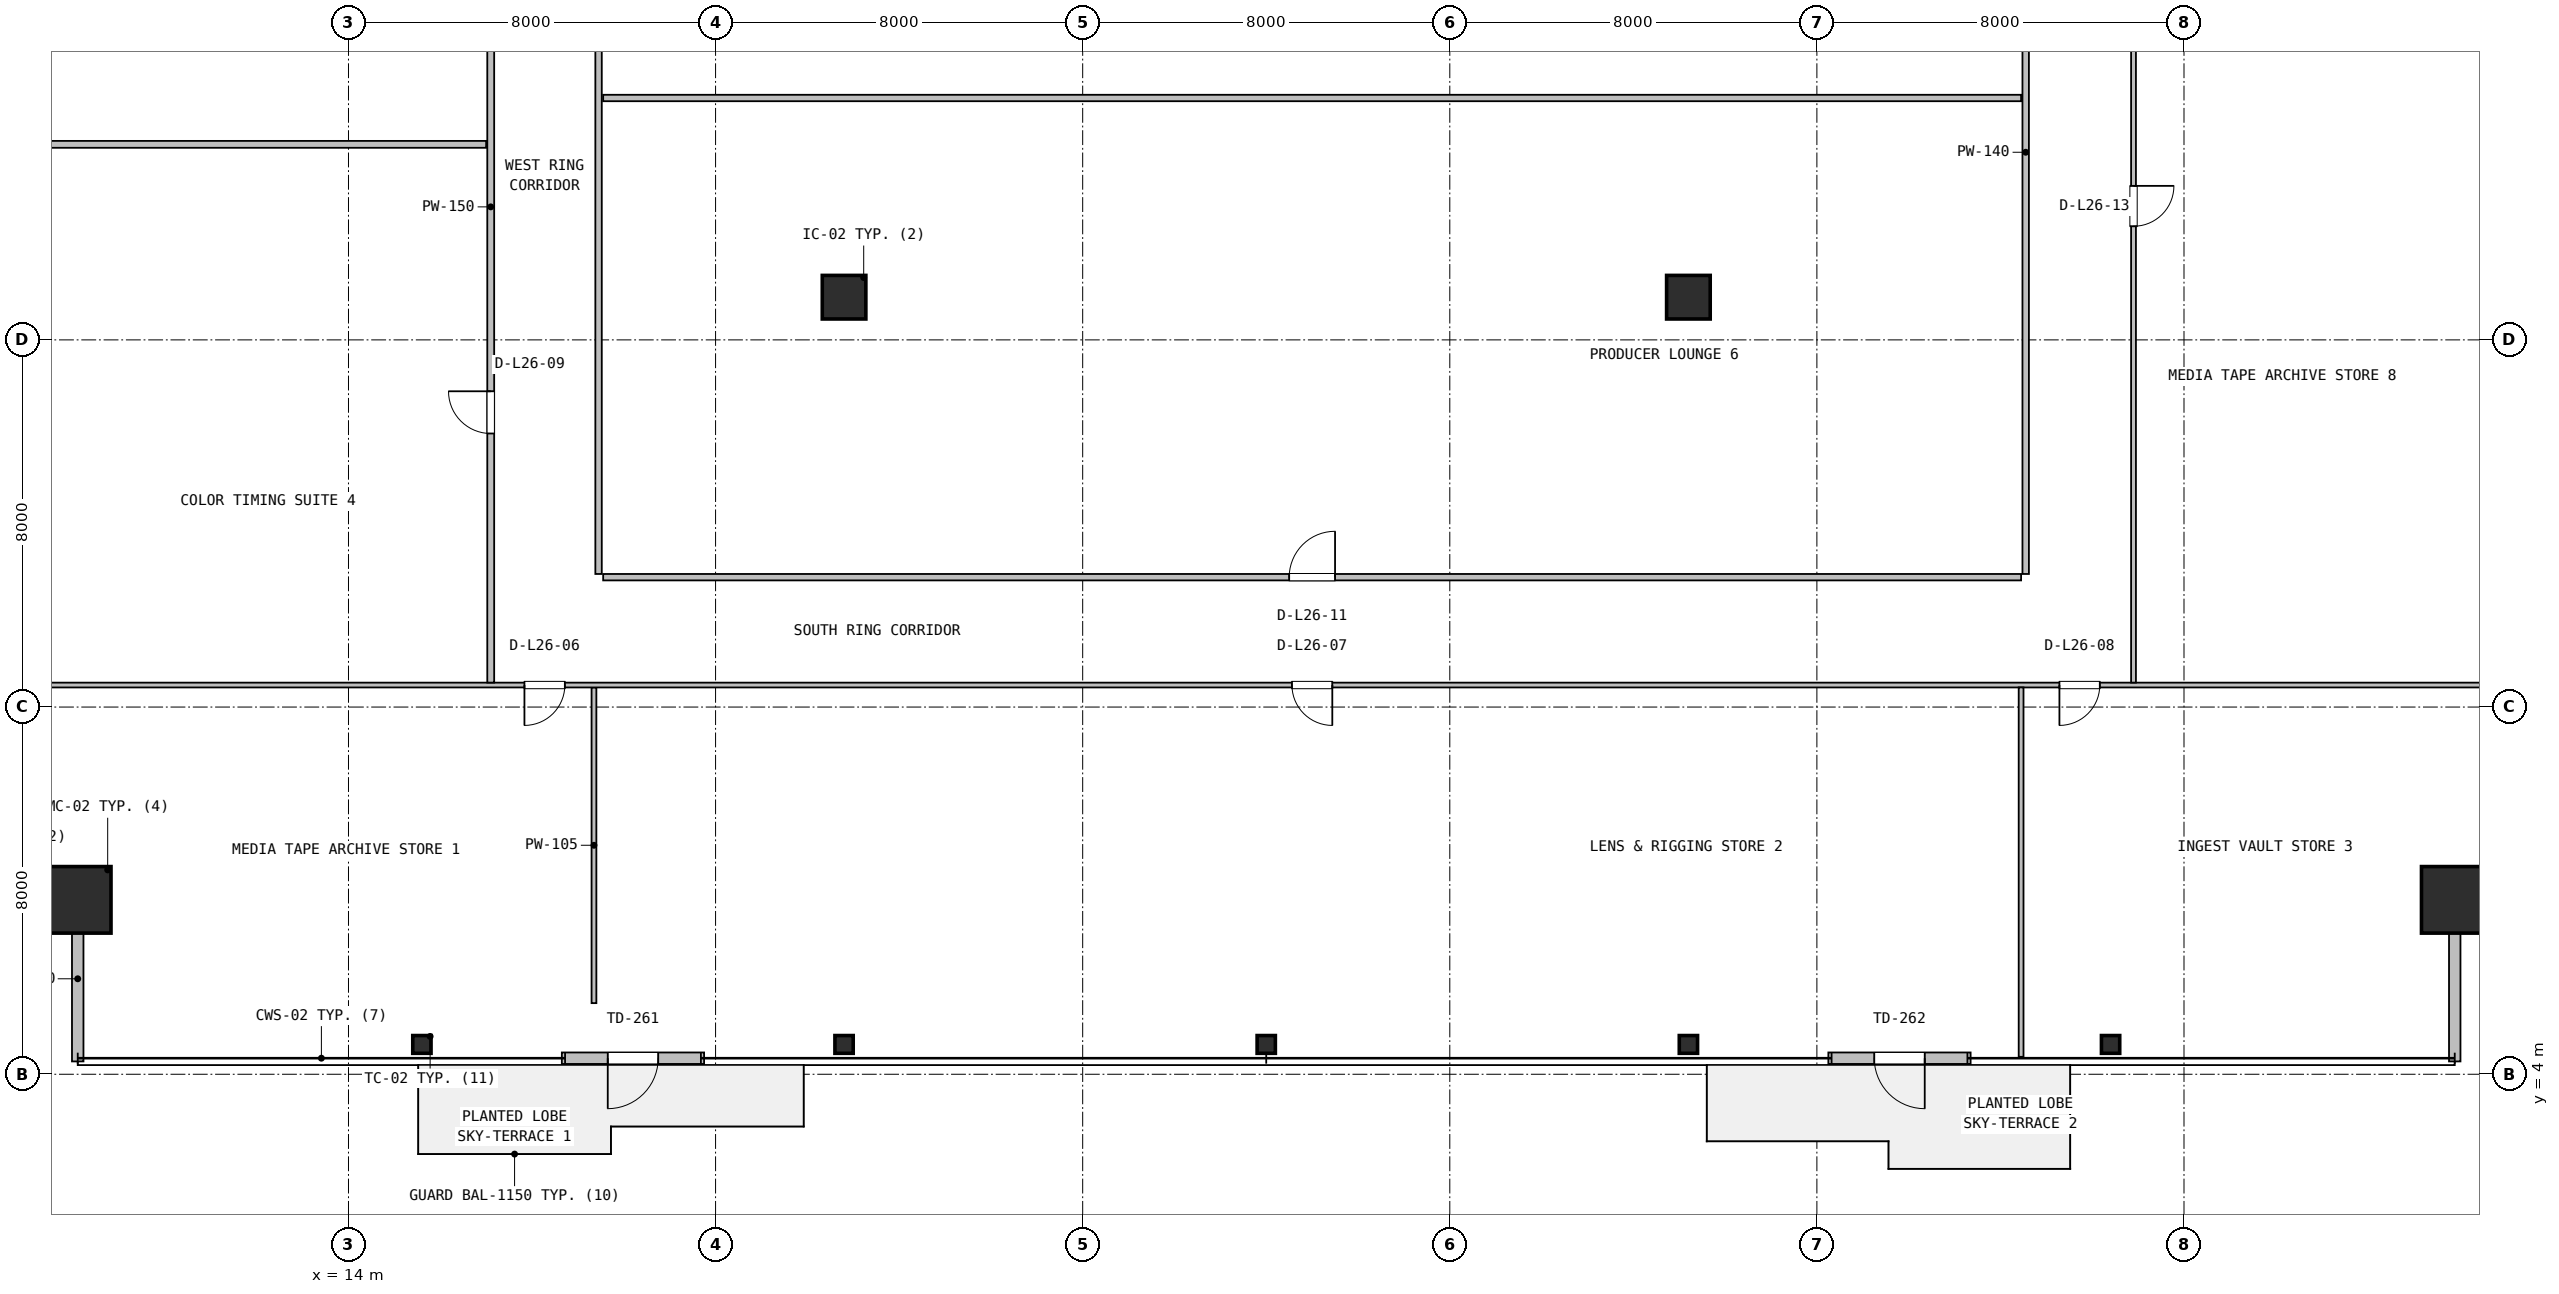
"""IFC4 building model, lengths in metres.
Left out: names, types, materials, properties, quantities, classifications, styles, units other than length and angle.
Written with IfcOpenShell. Run it as: python <this file> out.ifc"""

import sys

from ifc_helpers import new_model, si_unit, direction, frame, frame_2d, origin, origin_2d, place, context, subcontext, project, spatial, rectangle, hollow_rectangle, i_section, extrude, source, transform, mapped, element, fill, save


model = new_model("IFC4")
c1 = context("Model", 3, precision=1e-05, world=origin(), true_north=direction((0.0, 1.0)))
c2 = subcontext(c1, "Body", "Model", "MODEL_VIEW")
j1 = project(units=[si_unit("LENGTHUNIT", "METRE"), si_unit("PLANEANGLEUNIT", "RADIAN")], contexts=[c1])
p1 = place(None, origin())
s1 = spatial("IfcSite", under=j1, at=p1, CompositionType="ELEMENT")
p2 = place(p1, origin())
s2 = spatial("IfcBuilding", under=s1, at=p2, CompositionType="ELEMENT")
p3 = place(p2, frame((0.0, 0.0, 110.6)))
s3 = spatial("IfcBuildingStorey", under=s2, at=p3, CompositionType="ELEMENT", Elevation=110.6)
m1 = source(origin(), c2, "Body", "SweptSolid", [
    extrude(hollow_rectangle(XDim=1.45, YDim=1.45, WallThickness=0.055, at=origin_2d()), origin(), (0.0, 0.0, 1.0), 3.8),
])
for number, where, z_axis, x_axis in (
    (1, (8.1, 7.8, 0.0), (0.0, 0.0, 1.0), (1.0, 0.0, 0.0)),
    (2, (59.9, 7.8, 0.0), (0.0, 0.0, 1.0), (1.0, 0.0, 0.0)),
):
    element("IfcColumn", number, at=place(p3, frame(where, z_axis=z_axis, x_axis=x_axis)), inside=s3, PredefinedType="COLUMN", context=c2, shape_type="MappedRepresentation", body=[
        mapped(m1, transform((0.0, 0.0, 0.0), x_axis=(1.0, 0.0, 0.0), y_axis=(0.0, 1.0, 0.0), z_axis=(0.0, 0.0, 1.0), scale=1.0)),
    ])
m2 = source(origin(), c2, "Body", "SweptSolid", [
    extrude(i_section(OverallWidth=0.398, OverallDepth=0.387, WebThickness=0.021, FlangeThickness=0.033, FilletRadius=0.018, at=origin_2d()), origin(), (0.0, 0.0, 1.0), 3.8),
])
for number, where, z_axis, x_axis in (
    (3, (15.6, 4.65, 0.0), (0.0, 0.0, 1.0), (1.0, 0.0, 0.0)),
    (4, (24.8, 4.65, 0.0), (0.0, 0.0, 1.0), (1.0, 0.0, 0.0)),
    (5, (34.0, 4.65, 0.0), (0.0, 0.0, 1.0), (1.0, 0.0, 0.0)),
    (6, (43.2, 4.65, 0.0), (0.0, 0.0, 1.0), (1.0, 0.0, 0.0)),
    (7, (52.4, 4.65, 0.0), (0.0, 0.0, 1.0), (1.0, 0.0, 0.0)),
):
    element("IfcColumn", number, at=place(p3, frame(where, z_axis=z_axis, x_axis=x_axis)), inside=s3, PredefinedType="COLUMN", context=c2, shape_type="MappedRepresentation", body=[
        mapped(m2, transform((0.0, 0.0, 0.0), x_axis=(1.0, 0.0, 0.0), y_axis=(0.0, 1.0, 0.0), z_axis=(0.0, 0.0, 1.0), scale=1.0)),
    ])
m3 = source(origin(), c2, "Body", "SweptSolid", [
    extrude(rectangle(XDim=0.95, YDim=0.95, at=origin_2d()), origin(), (0.0, 0.0, 1.0), 3.8),
])
for number, where, z_axis, x_axis in (
    (8, (24.8, 20.93, 0.0), (0.0, 0.0, 1.0), (1.0, 0.0, 0.0)),
    (9, (43.2, 20.93, 0.0), (0.0, 0.0, 1.0), (1.0, 0.0, 0.0)),
):
    element("IfcColumn", number, at=place(p3, frame(where, z_axis=z_axis, x_axis=x_axis)), inside=s3, PredefinedType="COLUMN", context=c2, shape_type="MappedRepresentation", body=[
        mapped(m3, transform((0.0, 0.0, 0.0), x_axis=(1.0, 0.0, 0.0), y_axis=(0.0, 1.0, 0.0), z_axis=(0.0, 0.0, 1.0), scale=1.0)),
    ])
p4 = place(p3, frame((18.65, 4.35, 0.0), z_axis=(0.0, 0.0, 1.0), x_axis=(1.0, 0.0, 0.0)))
e10 = element("IfcWall", 10, at=p4, inside=s3, PredefinedType="SOLIDWALL", context=c2, shape_type="SweptSolid", body=[
    extrude(rectangle(XDim=3.1, YDim=0.25, at=frame_2d((1.55, 0.0))), origin(), (0.0, 0.0, 1.0), 3.53),
])
p5 = place(p4, frame((1.0, 0.0, 0.0)))
e11 = element("IfcOpeningElement", 11, at=p5, cuts=e10, PredefinedType="OPENING", context=c2, shape_type="SweptSolid", body=[
    extrude(rectangle(XDim=1.1, YDim=2.15, at=frame_2d((0.55, 1.075))), frame((0.0, 0.135, 0.0), z_axis=(0.0, -1.0, 0.0), x_axis=(1.0, 0.0, 0.0)), (0.0, 0.0, 1.0), 0.27),
])
p6 = place(p3, frame((46.25, 4.35, 0.0), z_axis=(0.0, 0.0, 1.0), x_axis=(1.0, 0.0, 0.0)))
e12 = element("IfcWall", 12, at=p6, inside=s3, PredefinedType="SOLIDWALL", context=c2, shape_type="SweptSolid", body=[
    extrude(rectangle(XDim=3.1, YDim=0.25, at=frame_2d((1.55, 0.0))), origin(), (0.0, 0.0, 1.0), 3.53),
])
p7 = place(p6, frame((1.0, 0.0, 0.0)))
e13 = element("IfcOpeningElement", 13, at=p7, cuts=e12, PredefinedType="OPENING", context=c2, shape_type="SweptSolid", body=[
    extrude(rectangle(XDim=1.1, YDim=2.15, at=frame_2d((0.55, 1.075))), frame((0.0, 0.135, 0.0), z_axis=(0.0, -1.0, 0.0), x_axis=(1.0, 0.0, 0.0)), (0.0, 0.0, 1.0), 0.27),
])
for number, where, z_axis, x_axis in (
    (14, (8.1, 4.28, 0.0), (0.0, 0.0, 1.0), (0.0, 1.0, 0.0)),
    (15, (59.9, 4.28, 0.0), (0.0, 0.0, 1.0), (0.0, 1.0, 0.0)),
):
    element("IfcWall", number, at=place(p3, frame(where, z_axis=z_axis, x_axis=x_axis)), inside=s3, PredefinedType="SOLIDWALL", context=c2, shape_type="SweptSolid", body=[
        extrude(rectangle(XDim=3.6, YDim=0.25, at=frame_2d((1.8, 0.0))), origin(), (0.0, 0.0, 1.0), 3.108),
    ])
p8 = place(p3, frame((19.35, 5.55, 0.0), z_axis=(0.0, 0.0, 1.0), x_axis=(0.0, 1.0, 0.0)))
e16 = element("IfcWall", 16, at=p8, inside=s3, PredefinedType="PARTITIONING", context=c2, shape_type="SweptSolid", body=[
    extrude(rectangle(XDim=6.878, YDim=0.105, at=frame_2d((3.439, 0.0))), origin(), (0.0, 0.0, 1.0), 3.222),
])
p9 = place(p3, frame((4.68, 12.48, 0.0), z_axis=(0.0, 0.0, 1.0), x_axis=(1.0, 0.0, 0.0)))
e17 = element("IfcWall", 17, at=p9, inside=s3, PredefinedType="PARTITIONING", context=c2, shape_type="SweptSolid", body=[
    extrude(rectangle(XDim=58.64, YDim=0.105, at=frame_2d((29.32, 0.0))), origin(), (0.0, 0.0, 1.0), 2.83),
])
p10 = place(p9, frame((13.155, 0.0, 0.0)))
e18 = element("IfcOpeningElement", 18, at=p10, cuts=e17, PredefinedType="OPENING", context=c2, shape_type="SweptSolid", body=[
    extrude(rectangle(XDim=0.88, YDim=2.06, at=frame_2d((0.44, 1.03))), frame((0.0, 0.062, 0.0), z_axis=(0.0, -1.0, 0.0), x_axis=(1.0, 0.0, 0.0)), (0.0, 0.0, 1.0), 0.125),
])
p11 = place(p9, frame((29.88, 0.0, 0.0)))
e19 = element("IfcOpeningElement", 19, at=p11, cuts=e17, PredefinedType="OPENING", context=c2, shape_type="SweptSolid", body=[
    extrude(rectangle(XDim=0.88, YDim=2.06, at=frame_2d((0.44, 1.03))), frame((0.0, 0.062, 0.0), z_axis=(0.0, -1.0, 0.0), x_axis=(1.0, 0.0, 0.0)), (0.0, 0.0, 1.0), 0.125),
])
p12 = place(p9, frame((46.605, 0.0, 0.0)))
e20 = element("IfcOpeningElement", 20, at=p12, cuts=e17, PredefinedType="OPENING", context=c2, shape_type="SweptSolid", body=[
    extrude(rectangle(XDim=0.88, YDim=2.06, at=frame_2d((0.44, 1.03))), frame((0.0, 0.062, 0.0), z_axis=(0.0, -1.0, 0.0), x_axis=(1.0, 0.0, 0.0)), (0.0, 0.0, 1.0), 0.125),
])
p13 = place(p3, frame((50.45, 4.38, 0.0), z_axis=(0.0, 0.0, 1.0), x_axis=(0.0, 1.0, 0.0)))
e21 = element("IfcWall", 21, at=p13, inside=s3, PredefinedType="PARTITIONING", context=c2, shape_type="SweptSolid", body=[
    extrude(rectangle(XDim=8.048, YDim=0.105, at=frame_2d((4.024, 0.0))), origin(), (0.0, 0.0, 1.0), 3.108),
])
p14 = place(p3, frame((17.1, 12.533, 0.0), z_axis=(0.0, 0.0, 1.0), x_axis=(0.0, 1.0, 0.0)))
e22 = element("IfcWall", 22, at=p14, inside=s3, PredefinedType="PARTITIONING", context=c2, shape_type="SweptSolid", body=[
    extrude(rectangle(XDim=20.73, YDim=0.15, at=frame_2d((10.365, 0.0))), origin(), (0.0, 0.0, 1.0), 3.222),
])
p15 = place(p14, frame((5.427, 0.0, 0.0)))
e23 = element("IfcOpeningElement", 23, at=p15, cuts=e22, PredefinedType="OPENING", context=c2, shape_type="SweptSolid", body=[
    extrude(rectangle(XDim=0.92, YDim=2.08, at=frame_2d((0.46, 1.04))), frame((0.0, 0.085, 0.0), z_axis=(0.0, -1.0, 0.0), x_axis=(1.0, 0.0, 0.0)), (0.0, 0.0, 1.0), 0.17),
])
p16 = place(p14, frame((15.797, 0.0, 0.0)))
e24 = element("IfcOpeningElement", 24, at=p16, cuts=e22, PredefinedType="OPENING", context=c2, shape_type="SweptSolid", body=[
    extrude(rectangle(XDim=1.05, YDim=2.1, at=frame_2d((0.525, 1.05))), frame((0.0, 0.085, 0.0), z_axis=(0.0, -1.0, 0.0), x_axis=(1.0, 0.0, 0.0)), (0.0, 0.0, 1.0), 0.17),
])
p17 = place(p3, frame((4.68, 24.26, 0.0), z_axis=(0.0, 0.0, 1.0), x_axis=(1.0, 0.0, 0.0)))
e25 = element("IfcWall", 25, at=p17, inside=s3, PredefinedType="PARTITIONING", context=c2, shape_type="SweptSolid", body=[
    extrude(rectangle(XDim=12.32, YDim=0.15, at=frame_2d((6.16, 0.0))), origin(), (0.0, 0.0, 1.0), 3.108),
])
p18 = place(p3, frame((19.55, 14.83, 0.0), z_axis=(0.0, 0.0, 1.0), x_axis=(1.0, 0.0, 0.0)))
e26 = element("IfcWall", 26, at=p18, inside=s3, PredefinedType="PARTITIONING", context=c2, shape_type="SweptSolid", body=[
    extrude(rectangle(XDim=30.9, YDim=0.14, at=frame_2d((15.45, 0.0))), origin(), (0.0, 0.0, 1.0), 2.83),
])
p19 = place(p18, frame((14.95, 0.0, 0.0)))
e27 = element("IfcOpeningElement", 27, at=p19, cuts=e26, PredefinedType="OPENING", context=c2, shape_type="SweptSolid", body=[
    extrude(rectangle(XDim=1.0, YDim=2.1, at=frame_2d((0.5, 1.05))), frame((0.0, 0.08, 0.0), z_axis=(0.0, -1.0, 0.0), x_axis=(1.0, 0.0, 0.0)), (0.0, 0.0, 1.0), 0.16),
])
p20 = place(p3, frame((50.55, 14.9, 0.0), z_axis=(0.0, 0.0, 1.0), x_axis=(0.0, 1.0, 0.0)))
e28 = element("IfcWall", 28, at=p20, inside=s3, PredefinedType="PARTITIONING", context=c2, shape_type="SweptSolid", body=[
    extrude(rectangle(XDim=18.375, YDim=0.14, at=frame_2d((9.188, 0.0))), origin(), (0.0, 0.0, 1.0), 3.222),
])
p21 = place(p3, frame((19.55, 25.27, 0.0), z_axis=(0.0, 0.0, 1.0), x_axis=(1.0, 0.0, 0.0)))
e29 = element("IfcWall", 29, at=p21, inside=s3, PredefinedType="PARTITIONING", context=c2, shape_type="SweptSolid", body=[
    extrude(rectangle(XDim=30.9, YDim=0.14, at=frame_2d((15.45, 0.0))), origin(), (0.0, 0.0, 1.0), 2.83),
])
p22 = place(p3, frame((19.45, 14.9, 0.0), z_axis=(0.0, 0.0, 1.0), x_axis=(0.0, 1.0, 0.0)))
e30 = element("IfcWall", 30, at=p22, inside=s3, PredefinedType="PARTITIONING", context=c2, shape_type="SweptSolid", body=[
    extrude(rectangle(XDim=18.375, YDim=0.14, at=frame_2d((9.188, 0.0))), origin(), (0.0, 0.0, 1.0), 3.222),
])
p23 = place(p3, frame((52.9, 12.533, 0.0), z_axis=(0.0, 0.0, 1.0), x_axis=(0.0, 1.0, 0.0)))
e31 = element("IfcWall", 31, at=p23, inside=s3, PredefinedType="PARTITIONING", context=c2, shape_type="SweptSolid", body=[
    extrude(rectangle(XDim=20.764, YDim=0.105, at=frame_2d((10.382, 0.0))), origin(), (0.0, 0.0, 1.0), 3.222),
])
p24 = place(p23, frame((9.942, 0.0, 0.0)))
e32 = element("IfcOpeningElement", 32, at=p24, cuts=e31, PredefinedType="OPENING", context=c2, shape_type="SweptSolid", body=[
    extrude(rectangle(XDim=0.88, YDim=2.06, at=frame_2d((0.44, 1.03))), frame((0.0, 0.062, 0.0), z_axis=(0.0, -1.0, 0.0), x_axis=(1.0, 0.0, 0.0)), (0.0, 0.0, 1.0), 0.125),
])
m4 = source(origin(), c2, "Body", "SweptSolid", [
    extrude(rectangle(XDim=1.1, YDim=2.15, at=frame_2d((0.55, 1.075))), frame((0.0, 0.025, 0.0), z_axis=(0.0, -1.0, 0.0), x_axis=(1.0, 0.0, 0.0)), (0.0, 0.0, 1.0), 0.05),
])
p25 = place(p5, frame((1.1, 0.0, 0.0), z_axis=(0.0, 0.0, 1.0), x_axis=(-1.0, 0.0, 0.0)))
e33 = element("IfcDoor", 33, at=p25, inside=s3, OperationType="SINGLE_SWING_LEFT", PredefinedType="DOOR", context=c2, shape_type="MappedRepresentation", body=[
    mapped(m4, transform((0.0, 0.0, 0.0), x_axis=(1.0, 0.0, 0.0), y_axis=(0.0, 1.0, 0.0), z_axis=(0.0, 0.0, 1.0), scale=1.0)),
])
fill(e11, e33)
p26 = place(p7, frame((1.1, 0.0, 0.0), z_axis=(0.0, 0.0, 1.0), x_axis=(-1.0, 0.0, 0.0)))
e34 = element("IfcDoor", 34, at=p26, inside=s3, OperationType="SINGLE_SWING_RIGHT", PredefinedType="DOOR", context=c2, shape_type="MappedRepresentation", body=[
    mapped(m4, transform((0.0, 0.0, 0.0), x_axis=(1.0, 0.0, 0.0), y_axis=(0.0, 1.0, 0.0), z_axis=(0.0, 0.0, 1.0), scale=1.0)),
])
fill(e13, e34)
m5 = source(origin(), c2, "Body", "SweptSolid", [
    extrude(rectangle(XDim=0.88, YDim=2.06, at=frame_2d((0.44, 1.03))), frame((0.0, 0.025, 0.0), z_axis=(0.0, -1.0, 0.0), x_axis=(1.0, 0.0, 0.0)), (0.0, 0.0, 1.0), 0.05),
])
p27 = place(p10, frame((0.88, 0.0, 0.0), z_axis=(0.0, 0.0, 1.0), x_axis=(-1.0, 0.0, 0.0)))
e35 = element("IfcDoor", 35, at=p27, inside=s3, OperationType="SINGLE_SWING_LEFT", PredefinedType="DOOR", context=c2, shape_type="MappedRepresentation", body=[
    mapped(m5, transform((0.0, 0.0, 0.0), x_axis=(1.0, 0.0, 0.0), y_axis=(0.0, 1.0, 0.0), z_axis=(0.0, 0.0, 1.0), scale=1.0)),
])
fill(e18, e35)
p28 = place(p11, frame((0.88, 0.0, 0.0), z_axis=(0.0, 0.0, 1.0), x_axis=(-1.0, 0.0, 0.0)))
e36 = element("IfcDoor", 36, at=p28, inside=s3, OperationType="SINGLE_SWING_RIGHT", PredefinedType="DOOR", context=c2, shape_type="MappedRepresentation", body=[
    mapped(m5, transform((0.0, 0.0, 0.0), x_axis=(1.0, 0.0, 0.0), y_axis=(0.0, 1.0, 0.0), z_axis=(0.0, 0.0, 1.0), scale=1.0)),
])
fill(e19, e36)
p29 = place(p12, frame((0.88, 0.0, 0.0), z_axis=(0.0, 0.0, 1.0), x_axis=(-1.0, 0.0, 0.0)))
e37 = element("IfcDoor", 37, at=p29, inside=s3, OperationType="SINGLE_SWING_LEFT", PredefinedType="DOOR", context=c2, shape_type="MappedRepresentation", body=[
    mapped(m5, transform((0.0, 0.0, 0.0), x_axis=(1.0, 0.0, 0.0), y_axis=(0.0, 1.0, 0.0), z_axis=(0.0, 0.0, 1.0), scale=1.0)),
])
fill(e20, e37)
m6 = source(origin(), c2, "Body", "SweptSolid", [
    extrude(rectangle(XDim=0.92, YDim=2.08, at=frame_2d((0.46, 1.04))), frame((0.0, 0.025, 0.0), z_axis=(0.0, -1.0, 0.0), x_axis=(1.0, 0.0, 0.0)), (0.0, 0.0, 1.0), 0.05),
])
p30 = place(p15, origin())
e38 = element("IfcDoor", 38, at=p30, inside=s3, OperationType="SINGLE_SWING_RIGHT", PredefinedType="DOOR", context=c2, shape_type="MappedRepresentation", body=[
    mapped(m6, transform((0.0, 0.0, 0.0), x_axis=(1.0, 0.0, 0.0), y_axis=(0.0, 1.0, 0.0), z_axis=(0.0, 0.0, 1.0), scale=1.0)),
])
fill(e23, e38)
m7 = source(origin(), c2, "Body", "SweptSolid", [
    extrude(rectangle(XDim=1.0, YDim=2.1, at=frame_2d((0.5, 1.05))), frame((0.0, 0.025, 0.0), z_axis=(0.0, -1.0, 0.0), x_axis=(1.0, 0.0, 0.0)), (0.0, 0.0, 1.0), 0.05),
])
p31 = place(p19, origin())
e39 = element("IfcDoor", 39, at=p31, inside=s3, OperationType="SINGLE_SWING_RIGHT", PredefinedType="DOOR", context=c2, shape_type="MappedRepresentation", body=[
    mapped(m7, transform((0.0, 0.0, 0.0), x_axis=(1.0, 0.0, 0.0), y_axis=(0.0, 1.0, 0.0), z_axis=(0.0, 0.0, 1.0), scale=1.0)),
])
fill(e27, e39)
p32 = place(p24, frame((0.88, 0.0, 0.0), z_axis=(0.0, 0.0, 1.0), x_axis=(-1.0, 0.0, 0.0)))
e40 = element("IfcDoor", 40, at=p32, inside=s3, OperationType="SINGLE_SWING_RIGHT", PredefinedType="DOOR", context=c2, shape_type="MappedRepresentation", body=[
    mapped(m5, transform((0.0, 0.0, 0.0), x_axis=(1.0, 0.0, 0.0), y_axis=(0.0, 1.0, 0.0), z_axis=(0.0, 0.0, 1.0), scale=1.0)),
])
fill(e32, e40)
save(model, sys.argv[1])
